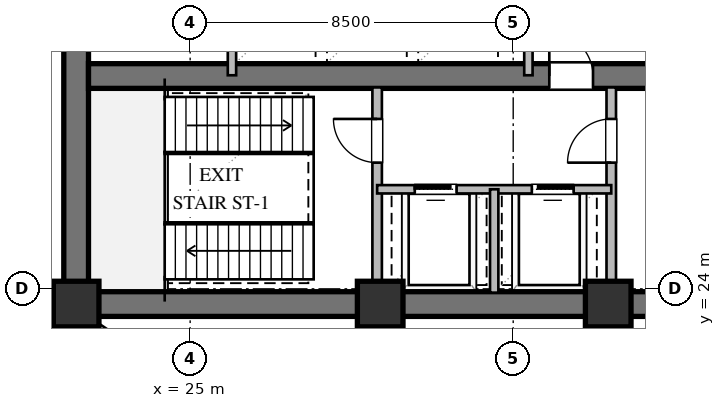
"""IFC4 building model, lengths in metres.
Left out: names, types, materials, properties, quantities, classifications, styles, units other than length and angle.
Written with IfcOpenShell. Run it as: python <this file> out.ifc"""

import sys

from ifc_helpers import new_model, si_unit, direction, frame, frame_2d, origin, origin_2d, place, context, subcontext, project, spatial, rectangle, extrude, element, fill, save


model = new_model("IFC4")
c1 = context("Model", 3, precision=1e-05, world=origin(), true_north=direction((0.0, 1.0)))
c2 = subcontext(c1, "Body", "Model", "MODEL_VIEW")
j1 = project(units=[si_unit("LENGTHUNIT", "METRE"), si_unit("PLANEANGLEUNIT", "RADIAN")], contexts=[c1])
p1 = place(None, origin())
s1 = spatial("IfcSite", under=j1, at=p1, CompositionType="ELEMENT")
p2 = place(p1, origin())
s2 = spatial("IfcBuilding", under=s1, at=p2, CompositionType="ELEMENT")
p3 = place(p2, frame((0.0, 0.0, 92.4)))
s3 = spatial("IfcBuildingStorey", under=s2, at=p3, CompositionType="ELEMENT", Elevation=92.4)
p4 = place(p3, frame((21.675, 23.6, 0.0), z_axis=(0.0, 0.0, 1.0), x_axis=(1.0, 0.0, 0.0)))
e1 = element("IfcWall", 1, at=p4, inside=s3, PredefinedType="SHEAR", context=c2, shape_type="SweptSolid", body=[
    extrude(rectangle(XDim=22.65, YDim=0.65, at=frame_2d((11.325, 0.0))), origin(), (0.0, 0.0, 1.0), 5.08),
])
p5 = place(p3, frame((22.0, 23.925, 0.0), z_axis=(0.0, 0.0, 1.0), x_axis=(0.0, 1.0, 0.0)))
e2 = element("IfcWall", 2, at=p5, inside=s3, PredefinedType="SHEAR", context=c2, shape_type="SweptSolid", body=[
    extrude(rectangle(XDim=12.15, YDim=0.65, at=frame_2d((6.075, 0.0))), origin(), (0.0, 0.0, 1.0), 5.08),
])
p6 = place(p3, frame((22.325, 29.6, 0.0), z_axis=(0.0, 0.0, 1.0), x_axis=(1.0, 0.0, 0.0)))
e3 = element("IfcWall", 3, at=p6, inside=s3, PredefinedType="SHEAR", context=c2, shape_type="SweptSolid", body=[
    extrude(rectangle(XDim=21.35, YDim=0.65, at=frame_2d((10.675, 0.0))), origin(), (0.0, 0.0, 1.0), 5.08),
])
p7 = place(p6, frame((12.125, 0.0, 0.0)))
e4 = element("IfcOpeningElement", 4, at=p7, cuts=e3, PredefinedType="OPENING", context=c2, shape_type="SweptSolid", body=[
    extrude(rectangle(XDim=1.15, YDim=2.1, at=frame_2d((0.575, 1.05))), frame((0.0, 0.335, 0.0), z_axis=(0.0, -1.0, 0.0), x_axis=(1.0, 0.0, 0.0)), (0.0, 0.0, 1.0), 0.67),
])
for number, where, z_axis, x_axis in (
    (5, (22.0, 23.6, 0.0), (0.0, 0.0, 1.0), (1.0, 0.0, 0.0)),
    (6, (30.0, 23.6, 0.0), (0.0, 0.0, 1.0), (1.0, 0.0, 0.0)),
    (7, (36.0, 23.6, 0.0), (0.0, 0.0, 1.0), (1.0, 0.0, 0.0)),
):
    element("IfcColumn", number, at=place(p3, frame(where, z_axis=z_axis, x_axis=x_axis)), inside=s3, PredefinedType="COLUMN", context=c2, shape_type="SweptSolid", body=[
        extrude(rectangle(XDim=1.2, YDim=1.2, at=origin_2d()), origin(), (0.0, 0.0, 1.0), 5.4),
    ])
p8 = place(p3, frame((29.92, 23.9, 0.0), z_axis=(0.0, 0.0, 1.0), x_axis=(0.0, 1.0, 0.0)))
e8 = element("IfcWall", 8, at=p8, inside=s3, PredefinedType="SOLIDWALL", context=c2, shape_type="SweptSolid", body=[
    extrude(rectangle(XDim=5.4, YDim=0.25, at=frame_2d((2.7, 0.0))), origin(), (0.0, 0.0, 1.0), 3.57),
])
p9 = place(p8, frame((3.421, 0.0, 0.0)))
e9 = element("IfcOpeningElement", 9, at=p9, cuts=e8, PredefinedType="OPENING", context=c2, shape_type="SweptSolid", body=[
    extrude(rectangle(XDim=1.15, YDim=2.1, at=frame_2d((0.575, 1.05))), frame((0.0, 0.135, 0.0), z_axis=(0.0, -1.0, 0.0), x_axis=(1.0, 0.0, 0.0)), (0.0, 0.0, 1.0), 0.27),
])
p10 = place(p3, frame((36.08, 23.9, 0.0), z_axis=(0.0, 0.0, 1.0), x_axis=(0.0, 1.0, 0.0)))
e10 = element("IfcWall", 10, at=p10, inside=s3, PredefinedType="SOLIDWALL", context=c2, shape_type="SweptSolid", body=[
    extrude(rectangle(XDim=5.4, YDim=0.25, at=frame_2d((2.7, 0.0))), origin(), (0.0, 0.0, 1.0), 5.08),
])
p11 = place(p10, frame((3.421, 0.0, 0.0)))
e11 = element("IfcOpeningElement", 11, at=p11, cuts=e10, PredefinedType="OPENING", context=c2, shape_type="SweptSolid", body=[
    extrude(rectangle(XDim=1.15, YDim=2.1, at=frame_2d((0.575, 1.05))), frame((0.0, 0.135, 0.0), z_axis=(0.0, -1.0, 0.0), x_axis=(1.0, 0.0, 0.0)), (0.0, 0.0, 1.0), 0.27),
])
p12 = place(p3, frame((29.92, 26.62, 0.0), z_axis=(0.0, 0.0, 1.0), x_axis=(1.0, 0.0, 0.0)))
e12 = element("IfcWall", 12, at=p12, inside=s3, PredefinedType="SOLIDWALL", context=c2, shape_type="SweptSolid", body=[
    extrude(rectangle(XDim=6.16, YDim=0.22, at=frame_2d((3.08, 0.0))), origin(), (0.0, 0.0, 1.0), 5.08),
])
p13 = place(p12, frame((0.99, 0.0, 0.0)))
e13 = element("IfcOpeningElement", 13, at=p13, cuts=e12, PredefinedType="OPENING", context=c2, shape_type="SweptSolid", body=[
    extrude(rectangle(XDim=1.1, YDim=2.1, at=frame_2d((0.55, 1.05))), frame((0.0, 0.12, 0.0), z_axis=(0.0, -1.0, 0.0), x_axis=(1.0, 0.0, 0.0)), (0.0, 0.0, 1.0), 0.24),
])
p14 = place(p12, frame((4.07, 0.0, 0.0)))
e14 = element("IfcOpeningElement", 14, at=p14, cuts=e12, PredefinedType="OPENING", context=c2, shape_type="SweptSolid", body=[
    extrude(rectangle(XDim=1.1, YDim=2.1, at=frame_2d((0.55, 1.05))), frame((0.0, 0.12, 0.0), z_axis=(0.0, -1.0, 0.0), x_axis=(1.0, 0.0, 0.0)), (0.0, 0.0, 1.0), 0.24),
])
p15 = place(p3, frame((33.0, 23.9, 0.0), z_axis=(0.0, 0.0, 1.0), x_axis=(0.0, 1.0, 0.0)))
e15 = element("IfcWall", 15, at=p15, inside=s3, PredefinedType="SOLIDWALL", context=c2, shape_type="SweptSolid", body=[
    extrude(rectangle(XDim=2.72, YDim=0.22, at=frame_2d((1.36, 0.0))), origin(), (0.0, 0.0, 1.0), 5.08),
])
for number, where, z_axis, x_axis in (
    (16, (26.1, 29.62, 0.0), (0.0, 0.0, 1.0), (0.0, 1.0, 0.0)),
    (17, (33.9, 29.62, 0.0), (0.0, 0.0, 1.0), (0.0, 1.0, 0.0)),
):
    element("IfcWall", number, at=place(p3, frame(where, z_axis=z_axis, x_axis=x_axis)), inside=s3, PredefinedType="SOLIDWALL", context=c2, shape_type="SweptSolid", body=[
        extrude(rectangle(XDim=2.36, YDim=0.22, at=frame_2d((1.18, 0.0))), origin(), (0.0, 0.0, 1.0), 5.08),
    ])
p16 = place(p9, origin())
e18 = element("IfcDoor", 18, at=p16, inside=s3, OperationType="SINGLE_SWING_RIGHT", PredefinedType="DOOR", context=c2, shape_type="SweptSolid", body=[
    extrude(rectangle(XDim=1.15, YDim=2.1, at=frame_2d((0.575, 1.05))), frame((0.0, 0.025, 0.0), z_axis=(0.0, -1.0, 0.0), x_axis=(1.0, 0.0, 0.0)), (0.0, 0.0, 1.0), 0.05),
])
fill(e9, e18)
p17 = place(p11, origin())
e19 = element("IfcDoor", 19, at=p17, inside=s3, OperationType="SINGLE_SWING_LEFT", PredefinedType="DOOR", context=c2, shape_type="SweptSolid", body=[
    extrude(rectangle(XDim=1.15, YDim=2.1, at=frame_2d((0.575, 1.05))), frame((0.0, 0.025, 0.0), z_axis=(0.0, -1.0, 0.0), x_axis=(1.0, 0.0, 0.0)), (0.0, 0.0, 1.0), 0.05),
])
fill(e11, e19)
p18 = place(p13, origin())
e20 = element("IfcDoor", 20, at=p18, inside=s3, OperationType="SLIDING_TO_LEFT", PredefinedType="DOOR", context=c2, shape_type="SweptSolid", body=[
    extrude(rectangle(XDim=1.1, YDim=2.1, at=frame_2d((0.55, 1.05))), frame((0.0, 0.025, 0.0), z_axis=(0.0, -1.0, 0.0), x_axis=(1.0, 0.0, 0.0)), (0.0, 0.0, 1.0), 0.05),
])
fill(e13, e20)
p19 = place(p14, origin())
e21 = element("IfcDoor", 21, at=p19, inside=s3, OperationType="SLIDING_TO_RIGHT", PredefinedType="DOOR", context=c2, shape_type="SweptSolid", body=[
    extrude(rectangle(XDim=1.1, YDim=2.1, at=frame_2d((0.55, 1.05))), frame((0.0, 0.025, 0.0), z_axis=(0.0, -1.0, 0.0), x_axis=(1.0, 0.0, 0.0)), (0.0, 0.0, 1.0), 0.05),
])
fill(e14, e21)
p20 = place(p7, origin())
e22 = element("IfcDoor", 22, at=p20, inside=s3, OperationType="SINGLE_SWING_LEFT", PredefinedType="DOOR", context=c2, shape_type="SweptSolid", body=[
    extrude(rectangle(XDim=1.15, YDim=2.1, at=frame_2d((0.575, 1.05))), frame((0.0, 0.025, 0.0), z_axis=(0.0, -1.0, 0.0), x_axis=(1.0, 0.0, 0.0)), (0.0, 0.0, 1.0), 0.05),
])
fill(e4, e22)
save(model, sys.argv[1])
